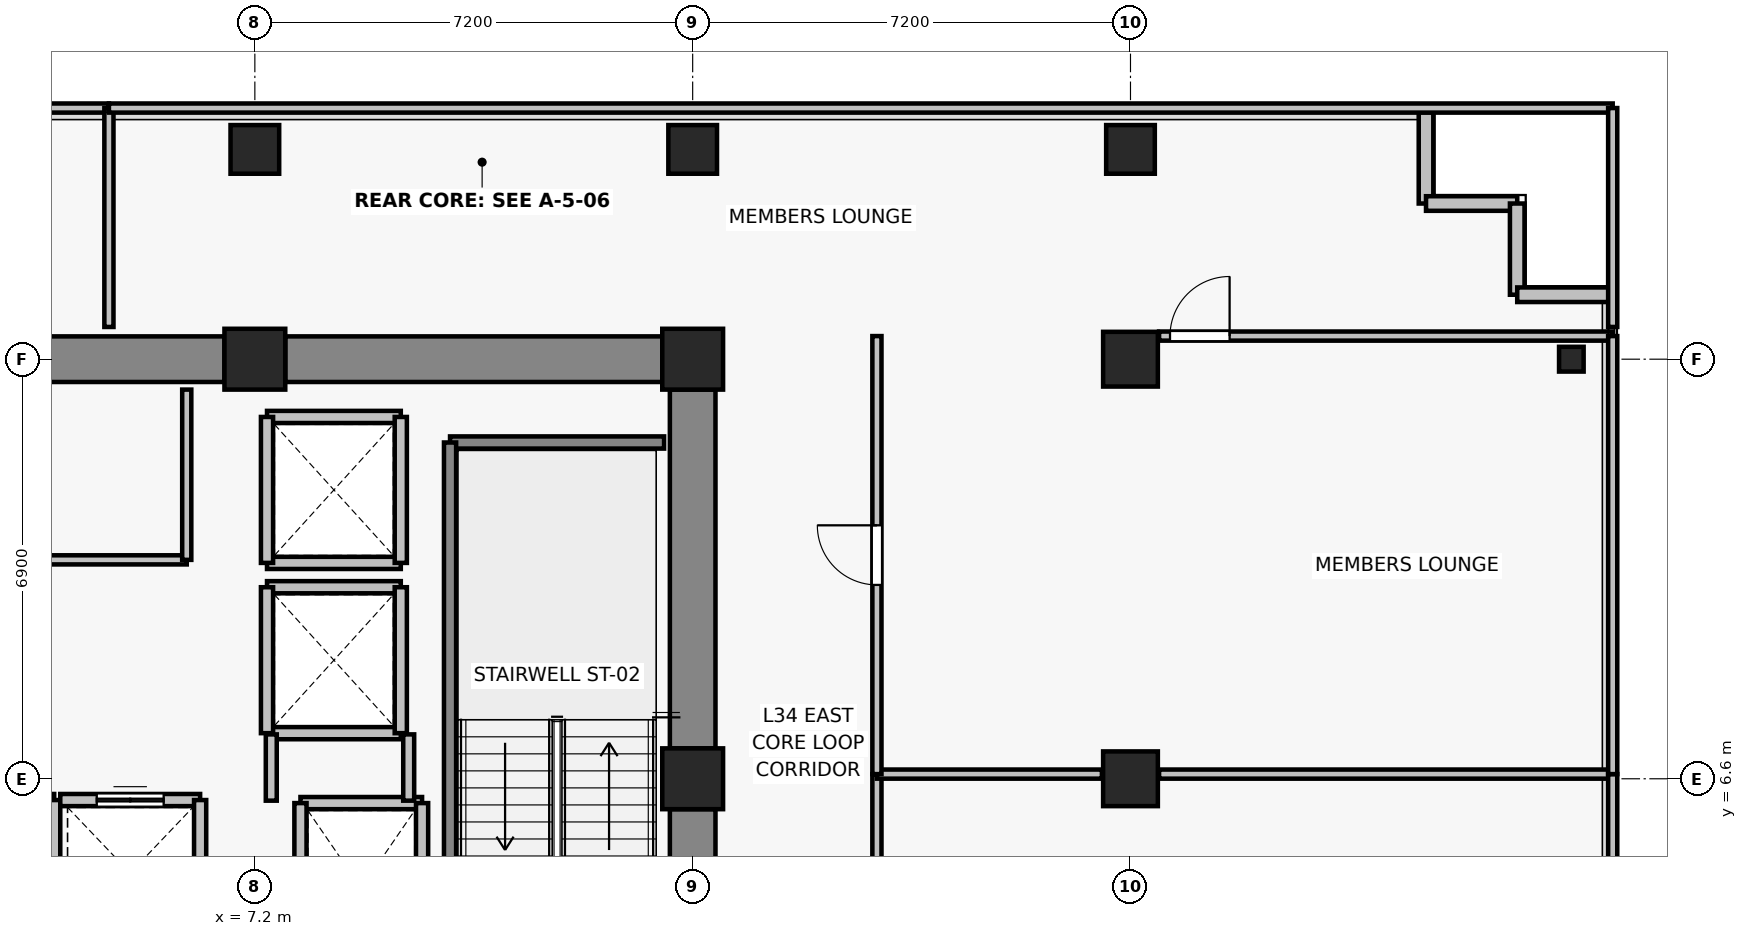
"""IFC4 building model, lengths in metres.
Left out: names, types, materials, properties, quantities, classifications, styles, units other than length and angle.
Written with IfcOpenShell. Run it as: python <this file> out.ifc"""

import sys

from ifc_helpers import new_model, si_unit, direction, frame, frame_2d, origin, origin_2d, place, context, subcontext, project, spatial, rectangle, i_section, extrude, source, transform, mapped, element, fill, save


model = new_model("IFC4")
c1 = context("Model", 3, precision=1e-05, world=origin(), true_north=direction((0.0, 1.0)))
c2 = subcontext(c1, "Body", "Model", "MODEL_VIEW")
j1 = project(units=[si_unit("LENGTHUNIT", "METRE"), si_unit("PLANEANGLEUNIT", "RADIAN")], contexts=[c1])
p1 = place(None, origin())
s1 = spatial("IfcSite", under=j1, at=p1, CompositionType="ELEMENT")
p2 = place(p1, origin())
s2 = spatial("IfcBuilding", under=s1, at=p2, CompositionType="ELEMENT")
p3 = place(p2, frame((0.0, 0.0, 123.1)))
s3 = spatial("IfcBuildingStorey", under=s2, at=p3, CompositionType="ELEMENT", Elevation=123.1)
for number, where, z_axis, x_axis in (
    (1, (14.4, 6.6, 0.0), (0.0, 0.0, 1.0), (1.0, 0.0, 0.0)),
    (2, (7.2, 13.5, 0.0), (0.0, 0.0, 1.0), (1.0, 0.0, 0.0)),
    (3, (14.4, 13.5, 0.0), (0.0, 0.0, 1.0), (1.0, 0.0, 0.0)),
):
    element("IfcColumn", number, at=place(p3, frame(where, z_axis=z_axis, x_axis=x_axis)), inside=s3, PredefinedType="COLUMN", context=c2, shape_type="SweptSolid", body=[
        extrude(rectangle(XDim=1.0, YDim=1.0, at=origin_2d()), origin(), (0.0, 0.0, 1.0), 3.3),
    ])
for number, where, z_axis, x_axis in (
    (4, (21.6, 6.6, 0.0), (0.0, 0.0, 1.0), (1.0, 0.0, 0.0)),
    (5, (21.6, 13.5, 0.0), (0.0, 0.0, 1.0), (1.0, 0.0, 0.0)),
):
    element("IfcColumn", number, at=place(p3, frame(where, z_axis=z_axis, x_axis=x_axis)), inside=s3, PredefinedType="COLUMN", context=c2, shape_type="SweptSolid", body=[
        extrude(rectangle(XDim=0.9, YDim=0.9, at=origin_2d()), origin(), (0.0, 0.0, 1.0), 3.3),
    ])
for number, where, z_axis, x_axis in (
    (6, (7.2, 16.95, 0.0), (0.0, 0.0, 1.0), (1.0, 0.0, 0.0)),
    (7, (14.4, 16.95, 0.0), (0.0, 0.0, 1.0), (1.0, 0.0, 0.0)),
    (8, (21.6, 16.95, 0.0), (0.0, 0.0, 1.0), (1.0, 0.0, 0.0)),
):
    element("IfcColumn", number, at=place(p3, frame(where, z_axis=z_axis, x_axis=x_axis)), inside=s3, PredefinedType="COLUMN", context=c2, shape_type="SweptSolid", body=[
        extrude(rectangle(XDim=0.8, YDim=0.8, at=origin_2d()), origin(), (0.0, 0.0, 1.0), 3.3),
    ])
p4 = place(p3, frame((28.85, 13.5, 0.0), z_axis=(0.0, 0.0, 1.0), x_axis=(1.0, 0.0, 0.0)))
e9 = element("IfcColumn", 9, at=p4, inside=s3, PredefinedType="COLUMN", context=c2, shape_type="SweptSolid", body=[
    extrude(i_section(OverallWidth=0.404, OverallDepth=0.407, WebThickness=0.022, FlangeThickness=0.032, FilletRadius=0.015, at=origin_2d()), origin(), (0.0, 0.0, 1.0), 3.3),
])
p5 = place(p3, frame((-6.7, 13.5, 0.0), z_axis=(0.0, 0.0, 1.0), x_axis=(1.0, 0.0, 0.0)))
e10 = element("IfcWall", 10, at=p5, inside=s3, PredefinedType="SHEAR", context=c2, shape_type="SweptSolid", body=[
    extrude(rectangle(XDim=13.4, YDim=0.75, at=frame_2d((6.7, 0.0))), origin(), (0.0, 0.0, 1.0), 3.075),
])
p6 = place(p3, frame((7.7, 13.5, 0.0), z_axis=(0.0, 0.0, 1.0), x_axis=(1.0, 0.0, 0.0)))
e11 = element("IfcWall", 11, at=p6, inside=s3, PredefinedType="SHEAR", context=c2, shape_type="SweptSolid", body=[
    extrude(rectangle(XDim=6.2, YDim=0.75, at=frame_2d((3.1, 0.0))), origin(), (0.0, 0.0, 1.0), 3.075),
])
p7 = place(p3, frame((14.4, -0.7, 0.0), z_axis=(0.0, 0.0, 1.0), x_axis=(0.0, 1.0, 0.0)))
e12 = element("IfcWall", 12, at=p7, inside=s3, PredefinedType="SHEAR", context=c2, shape_type="SweptSolid", body=[
    extrude(rectangle(XDim=6.8, YDim=0.75, at=frame_2d((3.4, 0.0))), origin(), (0.0, 0.0, 1.0), 3.075),
])
p8 = place(p3, frame((14.4, 7.1, 0.0), z_axis=(0.0, 0.0, 1.0), x_axis=(0.0, 1.0, 0.0)))
e13 = element("IfcWall", 13, at=p8, inside=s3, PredefinedType="SHEAR", context=c2, shape_type="SweptSolid", body=[
    extrude(rectangle(XDim=5.9, YDim=0.75, at=frame_2d((2.95, 0.0))), origin(), (0.0, 0.0, 1.0), 3.075),
])
for number, where, z_axis, x_axis in (
    (14, (26.46, 16.06, 0.0), (0.0, 0.0, 1.0), (0.0, 1.0, 0.0)),
    (15, (27.96, 16.06, 0.0), (0.0, 0.0, 1.0), (-1.0, 0.0, 0.0)),
    (16, (27.96, 14.56, 0.0), (0.0, 0.0, 1.0), (0.0, 1.0, 0.0)),
    (17, (29.46, 14.56, 0.0), (0.0, 0.0, 1.0), (-1.0, 0.0, 0.0)),
):
    element("IfcWall", number, at=place(p3, frame(where, z_axis=z_axis, x_axis=x_axis)), inside=s3, PredefinedType="SOLIDWALL", context=c2, shape_type="SweptSolid", body=[
        extrude(rectangle(XDim=1.5, YDim=0.24, at=frame_2d((0.75, 0.0))), origin(), (0.0, 0.0, 1.0), 3.075),
    ])
p9 = place(p3, frame((7.95, 6.2, 0.0), z_axis=(0.0, 0.0, 1.0), x_axis=(1.0, 0.0, 0.0)))
e18 = element("IfcWall", 18, at=p9, inside=s3, PredefinedType="SOLIDWALL", context=c2, shape_type="SweptSolid", body=[
    extrude(rectangle(XDim=2.0, YDim=0.2, at=frame_2d((1.0, 0.0))), origin(), (0.0, 0.0, 1.0), 3.075),
])
for number, where, z_axis, x_axis in (
    (19, (7.95, 3.4, 0.0), (0.0, 0.0, 1.0), (0.0, 1.0, 0.0)),
    (20, (9.95, 6.2, 0.0), (0.0, 0.0, 1.0), (0.0, -1.0, 0.0)),
):
    element("IfcWall", number, at=place(p3, frame(where, z_axis=z_axis, x_axis=x_axis)), inside=s3, PredefinedType="SOLIDWALL", context=c2, shape_type="SweptSolid", body=[
        extrude(rectangle(XDim=2.8, YDim=0.2, at=frame_2d((1.4, 0.0))), origin(), (0.0, 0.0, 1.0), 3.075),
    ])
p10 = place(p3, frame((1.6, 6.25, 0.0), z_axis=(0.0, 0.0, 1.0), x_axis=(1.0, 0.0, 0.0)))
e21 = element("IfcWall", 21, at=p10, inside=s3, PredefinedType="SOLIDWALL", context=c2, shape_type="SweptSolid", body=[
    extrude(rectangle(XDim=2.3, YDim=0.2, at=frame_2d((1.15, 0.0))), origin(), (0.0, 0.0, 1.0), 3.075),
])
p11 = place(p10, frame((0.6, 0.0, 0.0)))
e22 = element("IfcOpeningElement", 22, at=p11, cuts=e21, PredefinedType="OPENING", context=c2, shape_type="SweptSolid", body=[
    extrude(rectangle(XDim=1.1, YDim=2.2, at=frame_2d((0.55, 1.1))), frame((0.0, 0.11, 0.0), z_axis=(0.0, -1.0, 0.0), x_axis=(1.0, 0.0, 0.0)), (0.0, 0.0, 1.0), 0.22),
])
p12 = place(p3, frame((3.9, 6.25, 0.0), z_axis=(0.0, 0.0, 1.0), x_axis=(0.0, -1.0, 0.0)))
e23 = element("IfcWall", 23, at=p12, inside=s3, PredefinedType="SOLIDWALL", context=c2, shape_type="SweptSolid", body=[
    extrude(rectangle(XDim=2.4, YDim=0.2, at=frame_2d((1.2, 0.0))), origin(), (0.0, 0.0, 1.0), 3.075),
])
p13 = place(p3, frame((4.0, 6.25, 0.0), z_axis=(0.0, 0.0, 1.0), x_axis=(1.0, 0.0, 0.0)))
e24 = element("IfcWall", 24, at=p13, inside=s3, PredefinedType="SOLIDWALL", context=c2, shape_type="SweptSolid", body=[
    extrude(rectangle(XDim=2.3, YDim=0.2, at=frame_2d((1.15, 0.0))), origin(), (0.0, 0.0, 1.0), 3.075),
])
p14 = place(p13, frame((0.6, 0.0, 0.0)))
e25 = element("IfcOpeningElement", 25, at=p14, cuts=e24, PredefinedType="OPENING", context=c2, shape_type="SweptSolid", body=[
    extrude(rectangle(XDim=1.1, YDim=2.2, at=frame_2d((0.55, 1.1))), frame((0.0, 0.11, 0.0), z_axis=(0.0, -1.0, 0.0), x_axis=(1.0, 0.0, 0.0)), (0.0, 0.0, 1.0), 0.22),
])
p15 = place(p3, frame((6.3, 6.25, 0.0), z_axis=(0.0, 0.0, 1.0), x_axis=(0.0, -1.0, 0.0)))
e26 = element("IfcWall", 26, at=p15, inside=s3, PredefinedType="SOLIDWALL", context=c2, shape_type="SweptSolid", body=[
    extrude(rectangle(XDim=2.4, YDim=0.2, at=frame_2d((1.2, 0.0))), origin(), (0.0, 0.0, 1.0), 3.075),
])
for number, where, z_axis, x_axis in (
    (27, (9.6, 7.35, 0.0), (0.0, 0.0, 1.0), (-1.0, 0.0, 0.0)),
    (28, (7.4, 9.75, 0.0), (0.0, 0.0, 1.0), (1.0, 0.0, 0.0)),
):
    element("IfcWall", number, at=place(p3, frame(where, z_axis=z_axis, x_axis=x_axis)), inside=s3, PredefinedType="SOLIDWALL", context=c2, shape_type="SweptSolid", body=[
        extrude(rectangle(XDim=2.2, YDim=0.2, at=frame_2d((1.1, 0.0))), origin(), (0.0, 0.0, 1.0), 2.515),
    ])
p16 = place(p3, frame((7.4, 7.35, 0.0), z_axis=(0.0, 0.0, 1.0), x_axis=(0.0, 1.0, 0.0)))
e29 = element("IfcWall", 29, at=p16, inside=s3, PredefinedType="SOLIDWALL", context=c2, shape_type="SweptSolid", body=[
    extrude(rectangle(XDim=2.4, YDim=0.2, at=frame_2d((1.2, 0.0))), origin(), (0.0, 0.0, 1.0), 2.515),
])
p17 = place(p3, frame((9.6, 9.75, 0.0), z_axis=(0.0, 0.0, 1.0), x_axis=(0.0, -1.0, 0.0)))
e30 = element("IfcWall", 30, at=p17, inside=s3, PredefinedType="SOLIDWALL", context=c2, shape_type="SweptSolid", body=[
    extrude(rectangle(XDim=2.4, YDim=0.2, at=frame_2d((1.2, 0.0))), origin(), (0.0, 0.0, 1.0), 3.075),
])
for number, where, z_axis, x_axis in (
    (31, (9.6, 10.15, 0.0), (0.0, 0.0, 1.0), (-1.0, 0.0, 0.0)),
    (32, (7.4, 12.55, 0.0), (0.0, 0.0, 1.0), (1.0, 0.0, 0.0)),
):
    element("IfcWall", number, at=place(p3, frame(where, z_axis=z_axis, x_axis=x_axis)), inside=s3, PredefinedType="SOLIDWALL", context=c2, shape_type="SweptSolid", body=[
        extrude(rectangle(XDim=2.2, YDim=0.2, at=frame_2d((1.1, 0.0))), origin(), (0.0, 0.0, 1.0), 2.515),
    ])
p18 = place(p3, frame((7.4, 10.15, 0.0), z_axis=(0.0, 0.0, 1.0), x_axis=(0.0, 1.0, 0.0)))
e33 = element("IfcWall", 33, at=p18, inside=s3, PredefinedType="SOLIDWALL", context=c2, shape_type="SweptSolid", body=[
    extrude(rectangle(XDim=2.4, YDim=0.2, at=frame_2d((1.2, 0.0))), origin(), (0.0, 0.0, 1.0), 2.515),
])
p19 = place(p3, frame((9.6, 12.55, 0.0), z_axis=(0.0, 0.0, 1.0), x_axis=(0.0, -1.0, 0.0)))
e34 = element("IfcWall", 34, at=p19, inside=s3, PredefinedType="SOLIDWALL", context=c2, shape_type="SweptSolid", body=[
    extrude(rectangle(XDim=2.4, YDim=0.2, at=frame_2d((1.2, 0.0))), origin(), (0.0, 0.0, 1.0), 3.075),
])
p20 = place(p3, frame((10.41, 12.13, 0.0), z_axis=(0.0, 0.0, 1.0), x_axis=(1.0, 0.0, 0.0)))
e35 = element("IfcWall", 35, at=p20, inside=s3, PredefinedType="SOLIDWALL", context=c2, shape_type="SweptSolid", body=[
    extrude(rectangle(XDim=3.52, YDim=0.2, at=frame_2d((1.76, 0.0))), origin(), (0.0, 0.0, 1.0), 3.075),
])
p21 = place(p3, frame((10.41, 3.29, 0.0), z_axis=(0.0, 0.0, 1.0), x_axis=(0.0, 1.0, 0.0)))
e36 = element("IfcWall", 36, at=p21, inside=s3, PredefinedType="SOLIDWALL", context=c2, shape_type="SweptSolid", body=[
    extrude(rectangle(XDim=8.84, YDim=0.2, at=frame_2d((4.42, 0.0))), origin(), (0.0, 0.0, 1.0), 3.075),
])
p22 = place(p3, frame((7.47, 6.24, 0.0), z_axis=(0.0, 0.0, 1.0), x_axis=(0.0, 1.0, 0.0)))
e37 = element("IfcWall", 37, at=p22, inside=s3, PredefinedType="PARTITIONING", context=c2, shape_type="SweptSolid", body=[
    extrude(rectangle(XDim=1.09, YDim=0.18, at=frame_2d((0.545, 0.0))), origin(), (0.0, 0.0, 1.0), 2.515),
])
p23 = place(p3, frame((9.73, 7.33, 0.0), z_axis=(0.0, 0.0, 1.0), x_axis=(0.0, -1.0, 0.0)))
e38 = element("IfcWall", 38, at=p23, inside=s3, PredefinedType="PARTITIONING", context=c2, shape_type="SweptSolid", body=[
    extrude(rectangle(XDim=1.09, YDim=0.18, at=frame_2d((0.545, 0.0))), origin(), (0.0, 0.0, 1.0), 3.075),
])
p24 = place(p3, frame((6.08, 10.2, 0.0), z_axis=(0.0, 0.0, 1.0), x_axis=(-1.0, 0.0, 0.0)))
e39 = element("IfcWall", 39, at=p24, inside=s3, PredefinedType="PARTITIONING", context=c2, shape_type="SweptSolid", body=[
    extrude(rectangle(XDim=12.16, YDim=0.15, at=frame_2d((6.08, 0.0))), origin(), (0.0, 0.0, 1.0), 3.075),
])
p25 = place(p24, frame((7.005, 0.0, 0.0)))
e40 = element("IfcOpeningElement", 40, at=p25, cuts=e39, PredefinedType="OPENING", context=c2, shape_type="SweptSolid", body=[
    extrude(rectangle(XDim=1.15, YDim=2.15, at=frame_2d((0.575, 1.075))), frame((0.0, 0.085, 0.0), z_axis=(0.0, -1.0, 0.0), x_axis=(1.0, 0.0, 0.0)), (0.0, 0.0, 1.0), 0.17),
])
p26 = place(p3, frame((6.08, 13.0, 0.0), z_axis=(0.0, 0.0, 1.0), x_axis=(0.0, -1.0, 0.0)))
e41 = element("IfcWall", 41, at=p26, inside=s3, PredefinedType="PARTITIONING", context=c2, shape_type="SweptSolid", body=[
    extrude(rectangle(XDim=2.8, YDim=0.15, at=frame_2d((1.4, 0.0))), origin(), (0.0, 0.0, 1.0), 3.075),
])
p27 = place(p3, frame((22.07, 6.677, 0.0), z_axis=(0.0, 0.0, 1.0), x_axis=(1.0, 0.0, 0.0)))
e42 = element("IfcWall", 42, at=p27, inside=s3, PredefinedType="PARTITIONING", context=c2, shape_type="SweptSolid", body=[
    extrude(rectangle(XDim=7.46, YDim=0.15, at=frame_2d((3.73, 0.0))), origin(), (0.0, 0.0, 1.0), 2.565),
])
p28 = place(p3, frame((17.43, 1.46, 0.0), z_axis=(0.0, 0.0, 1.0), x_axis=(0.0, 1.0, 0.0)))
e43 = element("IfcWall", 43, at=p28, inside=s3, PredefinedType="PARTITIONING", context=c2, shape_type="SweptSolid", body=[
    extrude(rectangle(XDim=5.217, YDim=0.15, at=frame_2d((2.608, 0.0))), origin(), (0.0, 0.0, 1.0), 2.515),
])
p29 = place(p28, frame((2.118, 0.0, 0.0)))
e44 = element("IfcOpeningElement", 44, at=p29, cuts=e43, PredefinedType="OPENING", context=c2, shape_type="SweptSolid", body=[
    extrude(rectangle(XDim=0.98, YDim=2.15, at=frame_2d((0.49, 1.075))), frame((0.0, 0.085, 0.0), z_axis=(0.0, -1.0, 0.0), x_axis=(1.0, 0.0, 0.0)), (0.0, 0.0, 1.0), 0.17),
])
p30 = place(p3, frame((29.53, 6.677, 0.0), z_axis=(0.0, 0.0, 1.0), x_axis=(0.0, -1.0, 0.0)))
e45 = element("IfcWall", 45, at=p30, inside=s3, PredefinedType="PARTITIONING", context=c2, shape_type="SweptSolid", body=[
    extrude(rectangle(XDim=5.217, YDim=0.15, at=frame_2d((2.608, 0.0))), origin(), (0.0, 0.0, 1.0), 3.075),
])
p31 = place(p3, frame((21.13, 6.677, 0.0), z_axis=(0.0, 0.0, 1.0), x_axis=(-1.0, 0.0, 0.0)))
e46 = element("IfcWall", 46, at=p31, inside=s3, PredefinedType="PARTITIONING", context=c2, shape_type="SweptSolid", body=[
    extrude(rectangle(XDim=3.7, YDim=0.15, at=frame_2d((1.85, 0.0))), origin(), (0.0, 0.0, 1.0), 2.515),
])
p32 = place(p3, frame((22.07, 13.88, 0.0), z_axis=(0.0, 0.0, 1.0), x_axis=(1.0, 0.0, 0.0)))
e47 = element("IfcWall", 47, at=p32, inside=s3, PredefinedType="PARTITIONING", context=c2, shape_type="SweptSolid", body=[
    extrude(rectangle(XDim=7.46, YDim=0.15, at=frame_2d((3.73, 0.0))), origin(), (0.0, 0.0, 1.0), 3.075),
])
p33 = place(p32, frame((0.18, 0.0, 0.0)))
e48 = element("IfcOpeningElement", 48, at=p33, cuts=e47, PredefinedType="OPENING", context=c2, shape_type="SweptSolid", body=[
    extrude(rectangle(XDim=0.98, YDim=2.15, at=frame_2d((0.49, 1.075))), frame((0.0, 0.085, 0.0), z_axis=(0.0, -1.0, 0.0), x_axis=(1.0, 0.0, 0.0)), (0.0, 0.0, 1.0), 0.17),
])
p34 = place(p3, frame((17.43, 6.677, 0.0), z_axis=(0.0, 0.0, 1.0), x_axis=(0.0, 1.0, 0.0)))
e49 = element("IfcWall", 49, at=p34, inside=s3, PredefinedType="PARTITIONING", context=c2, shape_type="SweptSolid", body=[
    extrude(rectangle(XDim=7.203, YDim=0.15, at=frame_2d((3.602, 0.0))), origin(), (0.0, 0.0, 1.0), 2.515),
])
p35 = place(p34, frame((3.111, 0.0, 0.0)))
e50 = element("IfcOpeningElement", 50, at=p35, cuts=e49, PredefinedType="OPENING", context=c2, shape_type="SweptSolid", body=[
    extrude(rectangle(XDim=0.98, YDim=2.15, at=frame_2d((0.49, 1.075))), frame((0.0, 0.085, 0.0), z_axis=(0.0, -1.0, 0.0), x_axis=(1.0, 0.0, 0.0)), (0.0, 0.0, 1.0), 0.17),
])
p36 = place(p3, frame((29.53, 13.88, 0.0), z_axis=(0.0, 0.0, 1.0), x_axis=(0.0, -1.0, 0.0)))
e51 = element("IfcWall", 51, at=p36, inside=s3, PredefinedType="PARTITIONING", context=c2, shape_type="SweptSolid", body=[
    extrude(rectangle(XDim=7.203, YDim=0.15, at=frame_2d((3.602, 0.0))), origin(), (0.0, 0.0, 1.0), 3.075),
])
p37 = place(p3, frame((-25.53, 17.63, 0.0), z_axis=(0.0, 0.0, 1.0), x_axis=(1.0, 0.0, 0.0)))
e52 = element("IfcWall", 52, at=p37, inside=s3, PredefinedType="PARTITIONING", context=c2, shape_type="SweptSolid", body=[
    extrude(rectangle(XDim=30.33, YDim=0.15, at=frame_2d((15.165, 0.0))), origin(), (0.0, 0.0, 1.0), 3.075),
])
p38 = place(p3, frame((4.8, 17.63, 0.0), z_axis=(0.0, 0.0, 1.0), x_axis=(0.0, -1.0, 0.0)))
e53 = element("IfcWall", 53, at=p38, inside=s3, PredefinedType="PARTITIONING", context=c2, shape_type="SweptSolid", body=[
    extrude(rectangle(XDim=3.6, YDim=0.15, at=frame_2d((1.8, 0.0))), origin(), (0.0, 0.0, 1.0), 2.565),
])
p39 = place(p3, frame((4.8, 17.63, 0.0), z_axis=(0.0, 0.0, 1.0), x_axis=(1.0, 0.0, 0.0)))
e54 = element("IfcWall", 54, at=p39, inside=s3, PredefinedType="PARTITIONING", context=c2, shape_type="SweptSolid", body=[
    extrude(rectangle(XDim=24.73, YDim=0.15, at=frame_2d((12.365, 0.0))), origin(), (0.0, 0.0, 1.0), 3.075),
])
p40 = place(p3, frame((29.53, 17.63, 0.0), z_axis=(0.0, 0.0, 1.0), x_axis=(0.0, -1.0, 0.0)))
e55 = element("IfcWall", 55, at=p40, inside=s3, PredefinedType="PARTITIONING", context=c2, shape_type="SweptSolid", body=[
    extrude(rectangle(XDim=3.6, YDim=0.15, at=frame_2d((1.8, 0.0))), origin(), (0.0, 0.0, 1.0), 3.075),
])
m1 = source(origin(), c2, "Body", "SweptSolid", [
    extrude(rectangle(XDim=1.1, YDim=2.2, at=frame_2d((0.55, 1.1))), frame((0.0, 0.025, 0.0), z_axis=(0.0, -1.0, 0.0), x_axis=(1.0, 0.0, 0.0)), (0.0, 0.0, 1.0), 0.05),
])
p41 = place(p14, origin())
e56 = element("IfcDoor", 56, at=p41, inside=s3, OperationType="DOUBLE_DOOR_SLIDING", PredefinedType="DOOR", context=c2, shape_type="MappedRepresentation", body=[
    mapped(m1, transform((0.0, 0.0, 0.0), x_axis=(1.0, 0.0, 0.0), y_axis=(0.0, 1.0, 0.0), z_axis=(0.0, 0.0, 1.0), scale=1.0)),
])
fill(e25, e56)
m2 = source(origin(), c2, "Body", "SweptSolid", [
    extrude(rectangle(XDim=0.98, YDim=2.15, at=frame_2d((0.49, 1.075))), frame((0.0, 0.025, 0.0), z_axis=(0.0, -1.0, 0.0), x_axis=(1.0, 0.0, 0.0)), (0.0, 0.0, 1.0), 0.05),
])
p42 = place(p35, origin())
e57 = element("IfcDoor", 57, at=p42, inside=s3, OperationType="SINGLE_SWING_RIGHT", PredefinedType="DOOR", context=c2, shape_type="MappedRepresentation", body=[
    mapped(m2, transform((0.0, 0.0, 0.0), x_axis=(1.0, 0.0, 0.0), y_axis=(0.0, 1.0, 0.0), z_axis=(0.0, 0.0, 1.0), scale=1.0)),
])
fill(e50, e57)
p43 = place(p33, origin())
e58 = element("IfcDoor", 58, at=p43, inside=s3, OperationType="SINGLE_SWING_RIGHT", PredefinedType="DOOR", context=c2, shape_type="MappedRepresentation", body=[
    mapped(m2, transform((0.0, 0.0, 0.0), x_axis=(1.0, 0.0, 0.0), y_axis=(0.0, 1.0, 0.0), z_axis=(0.0, 0.0, 1.0), scale=1.0)),
])
fill(e48, e58)
save(model, sys.argv[1])
